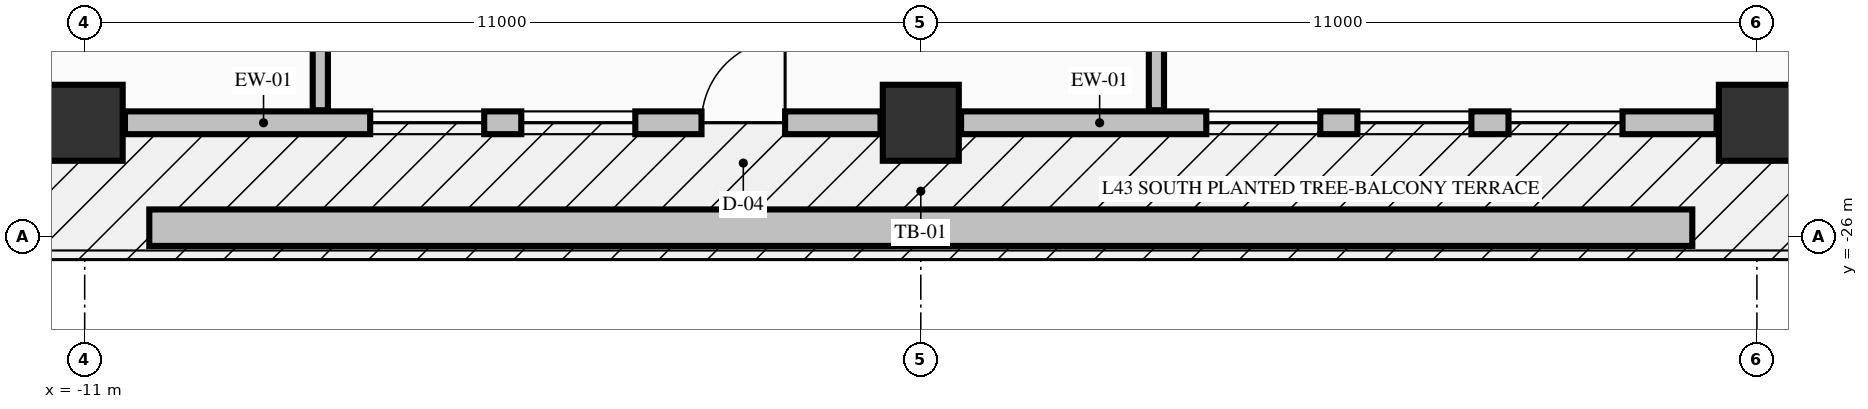
"""IFC4 building model, lengths in metres.
Left out: names, types, materials, properties, quantities, classifications, styles, units other than length and angle.
Written with IfcOpenShell. Run it as: python <this file> out.ifc"""

import sys

from ifc_helpers import new_model, si_unit, direction, frame, frame_2d, origin, origin_2d, place, context, subcontext, project, spatial, rectangle, extrude, element, fill, save


model = new_model("IFC4")
c1 = context("Model", 3, precision=1e-05, world=origin(), true_north=direction((0.0, 1.0)))
c2 = subcontext(c1, "Body", "Model", "MODEL_VIEW")
j1 = project(units=[si_unit("LENGTHUNIT", "METRE"), si_unit("PLANEANGLEUNIT", "RADIAN")], contexts=[c1])
p1 = place(None, origin())
s1 = spatial("IfcSite", under=j1, at=p1, CompositionType="ELEMENT")
p2 = place(p1, origin())
s2 = spatial("IfcBuilding", under=s1, at=p2, CompositionType="ELEMENT")
p3 = place(p2, frame((0.0, 0.0, 169.46)))
s3 = spatial("IfcBuildingStorey", under=s2, at=p3, CompositionType="ELEMENT", Elevation=169.46)
for number, where, z_axis, x_axis in (
    (1, (-11.0, -24.5, -0.25), (0.0, 0.0, 1.0), (1.0, 0.0, 0.0)),
    (2, (0.0, -24.5, -0.25), (0.0, 0.0, 1.0), (1.0, 0.0, 0.0)),
    (3, (11.0, -24.5, -0.25), (0.0, 0.0, 1.0), (1.0, 0.0, 0.0)),
):
    element("IfcColumn", number, at=place(p3, frame(where, z_axis=z_axis, x_axis=x_axis)), inside=s3, PredefinedType="COLUMN", context=c2, shape_type="SweptSolid", body=[
        extrude(rectangle(XDim=1.0, YDim=1.0, at=origin_2d()), origin(), (0.0, 0.0, 1.0), 3.4),
    ])
p4 = place(p3, frame((-10.47, -24.5, 0.0), z_axis=(0.0, 0.0, 1.0), x_axis=(1.0, 0.0, 0.0)))
e4 = element("IfcWall", 4, at=p4, inside=s3, PredefinedType="STANDARD", context=c2, shape_type="SweptSolid", body=[
    extrude(rectangle(XDim=9.94, YDim=0.3, at=frame_2d((4.97, 0.0))), origin(), (0.0, 0.0, 1.0), 2.542),
])
p5 = place(p4, frame((7.585, 0.0, 0.0)))
e5 = element("IfcOpeningElement", 5, at=p5, cuts=e4, PredefinedType="OPENING", context=c2, shape_type="SweptSolid", body=[
    extrude(rectangle(XDim=1.1, YDim=2.15, at=frame_2d((0.55, 1.075))), frame((0.0, 0.16, 0.0), z_axis=(0.0, -1.0, 0.0), x_axis=(1.0, 0.0, 0.0)), (0.0, 0.0, 1.0), 0.32),
])
p6 = place(p4, frame((3.226, 0.0, 0.72)))
e6 = element("IfcOpeningElement", 6, at=p6, cuts=e4, PredefinedType="OPENING", context=c2, shape_type="SweptSolid", body=[
    extrude(rectangle(XDim=1.5, YDim=1.6, at=frame_2d((0.75, 0.8))), frame((0.0, 0.16, 0.0), z_axis=(0.0, -1.0, 0.0), x_axis=(1.0, 0.0, 0.0)), (0.0, 0.0, 1.0), 0.32),
])
p7 = place(p4, frame((5.214, 0.0, 0.72)))
e7 = element("IfcOpeningElement", 7, at=p7, cuts=e4, PredefinedType="OPENING", context=c2, shape_type="SweptSolid", body=[
    extrude(rectangle(XDim=1.5, YDim=1.6, at=frame_2d((0.75, 0.8))), frame((0.0, 0.16, 0.0), z_axis=(0.0, -1.0, 0.0), x_axis=(1.0, 0.0, 0.0)), (0.0, 0.0, 1.0), 0.32),
])
p8 = place(p3, frame((0.53, -24.5, 0.0), z_axis=(0.0, 0.0, 1.0), x_axis=(1.0, 0.0, 0.0)))
e8 = element("IfcWall", 8, at=p8, inside=s3, PredefinedType="STANDARD", context=c2, shape_type="SweptSolid", body=[
    extrude(rectangle(XDim=9.94, YDim=0.3, at=frame_2d((4.97, 0.0))), origin(), (0.0, 0.0, 1.0), 2.542),
])
p9 = place(p8, frame((3.226, 0.0, 0.72)))
e9 = element("IfcOpeningElement", 9, at=p9, cuts=e8, PredefinedType="OPENING", context=c2, shape_type="SweptSolid", body=[
    extrude(rectangle(XDim=1.5, YDim=1.6, at=frame_2d((0.75, 0.8))), frame((0.0, 0.16, 0.0), z_axis=(0.0, -1.0, 0.0), x_axis=(1.0, 0.0, 0.0)), (0.0, 0.0, 1.0), 0.32),
])
p10 = place(p8, frame((5.214, 0.0, 0.72)))
e10 = element("IfcOpeningElement", 10, at=p10, cuts=e8, PredefinedType="OPENING", context=c2, shape_type="SweptSolid", body=[
    extrude(rectangle(XDim=1.5, YDim=1.6, at=frame_2d((0.75, 0.8))), frame((0.0, 0.16, 0.0), z_axis=(0.0, -1.0, 0.0), x_axis=(1.0, 0.0, 0.0)), (0.0, 0.0, 1.0), 0.32),
])
p11 = place(p8, frame((7.202, 0.0, 0.72)))
e11 = element("IfcOpeningElement", 11, at=p11, cuts=e8, PredefinedType="OPENING", context=c2, shape_type="SweptSolid", body=[
    extrude(rectangle(XDim=1.5, YDim=1.6, at=frame_2d((0.75, 0.8))), frame((0.0, 0.16, 0.0), z_axis=(0.0, -1.0, 0.0), x_axis=(1.0, 0.0, 0.0)), (0.0, 0.0, 1.0), 0.32),
])
p12 = place(p3, frame((-7.9, -24.335, 0.0), z_axis=(0.0, 0.0, 1.0), x_axis=(0.0, 1.0, 0.0)))
e12 = element("IfcWall", 12, at=p12, inside=s3, PredefinedType="PARTITIONING", context=c2, shape_type="SweptSolid", body=[
    extrude(rectangle(XDim=9.207, YDim=0.2, at=frame_2d((4.604, 0.0))), origin(), (0.0, 0.0, 1.0), 3.15),
])
p13 = place(p3, frame((3.1, -24.335, 0.0), z_axis=(0.0, 0.0, 1.0), x_axis=(0.0, 1.0, 0.0)))
e13 = element("IfcWall", 13, at=p13, inside=s3, PredefinedType="PARTITIONING", context=c2, shape_type="SweptSolid", body=[
    extrude(rectangle(XDim=8.507, YDim=0.2, at=frame_2d((4.253, 0.0))), origin(), (0.0, 0.0, 1.0), 3.15),
])
p14 = place(p3, frame((-10.15, -25.88, -0.04), z_axis=(0.0, 0.0, 1.0), x_axis=(1.0, 0.0, 0.0)))
e14 = element("IfcWall", 14, at=p14, inside=s3, PredefinedType="PARAPET", context=c2, shape_type="SweptSolid", body=[
    extrude(rectangle(XDim=20.3, YDim=0.48, at=frame_2d((10.15, 0.0))), origin(), (0.0, 0.0, 1.0), 0.52),
])
p15 = place(p5, origin())
e15 = element("IfcDoor", 15, at=p15, inside=s3, OperationType="SINGLE_SWING_RIGHT", PredefinedType="DOOR", context=c2, shape_type="SweptSolid", body=[
    extrude(rectangle(XDim=1.1, YDim=2.15, at=frame_2d((0.55, 1.075))), frame((0.0, 0.025, 0.0), z_axis=(0.0, -1.0, 0.0), x_axis=(1.0, 0.0, 0.0)), (0.0, 0.0, 1.0), 0.05),
])
fill(e5, e15)
p16 = place(p6, origin())
e16 = element("IfcWindow", 16, at=p16, inside=s3, PartitioningType="SINGLE_PANEL", PredefinedType="WINDOW", context=c2, shape_type="SweptSolid", body=[
    extrude(rectangle(XDim=1.5, YDim=1.6, at=frame_2d((0.75, 0.8))), frame((0.0, 0.03, 0.0), z_axis=(0.0, -1.0, 0.0), x_axis=(1.0, 0.0, 0.0)), (0.0, 0.0, 1.0), 0.06),
])
fill(e6, e16)
p17 = place(p7, origin())
e17 = element("IfcWindow", 17, at=p17, inside=s3, PartitioningType="SINGLE_PANEL", PredefinedType="WINDOW", context=c2, shape_type="SweptSolid", body=[
    extrude(rectangle(XDim=1.5, YDim=1.6, at=frame_2d((0.75, 0.8))), frame((0.0, 0.03, 0.0), z_axis=(0.0, -1.0, 0.0), x_axis=(1.0, 0.0, 0.0)), (0.0, 0.0, 1.0), 0.06),
])
fill(e7, e17)
p18 = place(p9, origin())
e18 = element("IfcWindow", 18, at=p18, inside=s3, PartitioningType="SINGLE_PANEL", PredefinedType="WINDOW", context=c2, shape_type="SweptSolid", body=[
    extrude(rectangle(XDim=1.5, YDim=1.6, at=frame_2d((0.75, 0.8))), frame((0.0, 0.03, 0.0), z_axis=(0.0, -1.0, 0.0), x_axis=(1.0, 0.0, 0.0)), (0.0, 0.0, 1.0), 0.06),
])
fill(e9, e18)
p19 = place(p10, origin())
e19 = element("IfcWindow", 19, at=p19, inside=s3, PartitioningType="SINGLE_PANEL", PredefinedType="WINDOW", context=c2, shape_type="SweptSolid", body=[
    extrude(rectangle(XDim=1.5, YDim=1.6, at=frame_2d((0.75, 0.8))), frame((0.0, 0.03, 0.0), z_axis=(0.0, -1.0, 0.0), x_axis=(1.0, 0.0, 0.0)), (0.0, 0.0, 1.0), 0.06),
])
fill(e10, e19)
p20 = place(p11, origin())
e20 = element("IfcWindow", 20, at=p20, inside=s3, PartitioningType="SINGLE_PANEL", PredefinedType="WINDOW", context=c2, shape_type="SweptSolid", body=[
    extrude(rectangle(XDim=1.5, YDim=1.6, at=frame_2d((0.75, 0.8))), frame((0.0, 0.03, 0.0), z_axis=(0.0, -1.0, 0.0), x_axis=(1.0, 0.0, 0.0)), (0.0, 0.0, 1.0), 0.06),
])
fill(e11, e20)
save(model, sys.argv[1])
